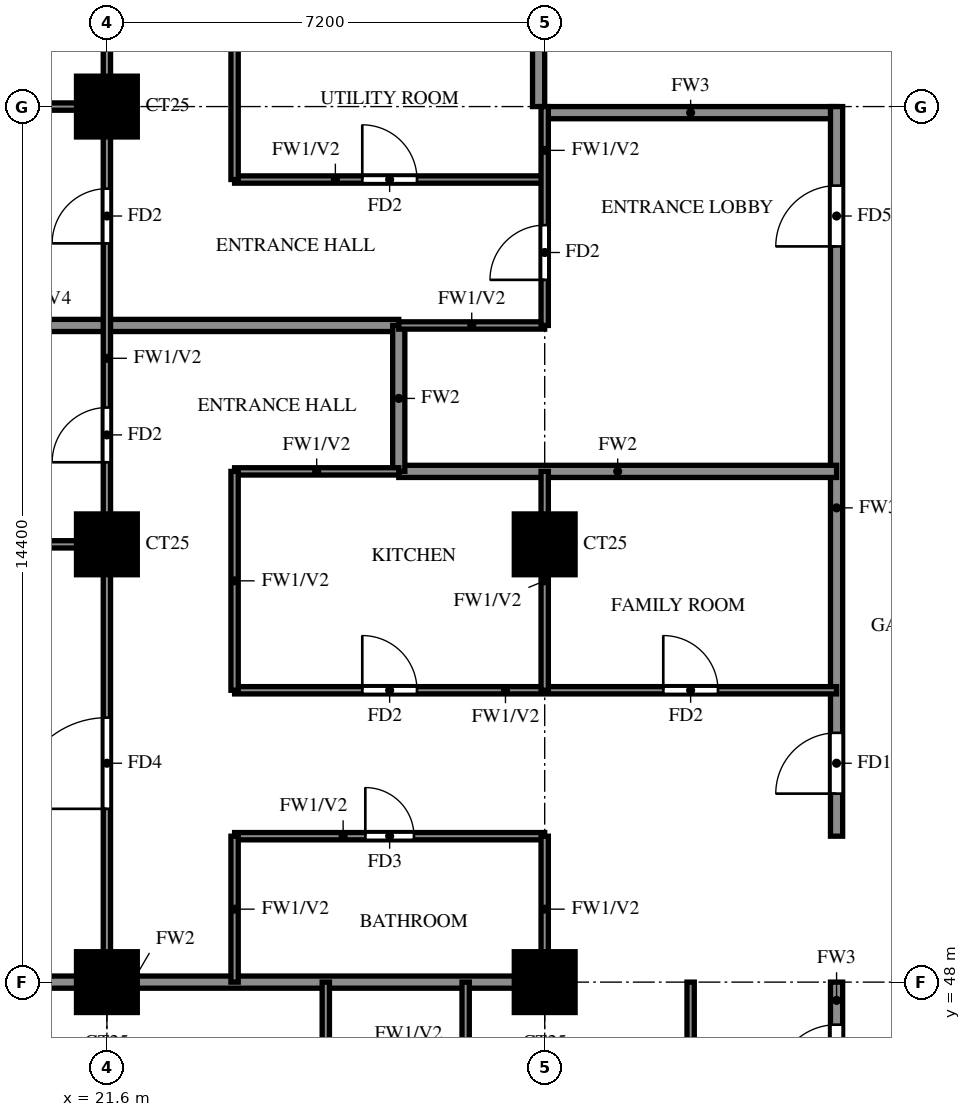
"""IFC4 building model, lengths in metres.
Left out: names, types, materials, properties, quantities, classifications, styles, units other than length and angle.
Written with IfcOpenShell. Run it as: python <this file> out.ifc"""

import sys

from ifc_helpers import new_model, si_unit, direction, frame, frame_2d, origin, origin_2d, place, context, subcontext, project, spatial, rectangle, extrude, source, transform, mapped, element, fill, save


model = new_model("IFC4")
c1 = context("Model", 3, precision=1e-05, world=origin(), true_north=direction((0.0, 1.0)))
c2 = subcontext(c1, "Body", "Model", "MODEL_VIEW")
j1 = project(units=[si_unit("LENGTHUNIT", "METRE"), si_unit("PLANEANGLEUNIT", "RADIAN")], contexts=[c1])
p1 = place(None, origin())
s1 = spatial("IfcSite", under=j1, at=p1, CompositionType="ELEMENT")
p2 = place(p1, origin())
s2 = spatial("IfcBuilding", under=s1, at=p2, CompositionType="ELEMENT")
p3 = place(p2, frame((0.0, 0.0, 153.5)))
s3 = spatial("IfcBuildingStorey", under=s2, at=p3, CompositionType="ELEMENT", Elevation=153.5)
m1 = source(origin(), c2, "Body", "SweptSolid", [
    extrude(rectangle(XDim=1.0, YDim=1.0, at=origin_2d()), origin(), (0.0, 0.0, 1.0), 3.2),
])
for number, where, z_axis, x_axis in (
    (1, (21.6, 48.0, 0.0), (0.0, 0.0, 1.0), (1.0, 0.0, 0.0)),
    (2, (28.8, 48.0, 0.0), (0.0, 0.0, 1.0), (1.0, 0.0, 0.0)),
    (3, (21.6, 55.2, 0.0), (0.0, 0.0, 1.0), (1.0, 0.0, 0.0)),
    (4, (28.8, 55.2, 0.0), (0.0, 0.0, 1.0), (1.0, 0.0, 0.0)),
    (5, (21.6, 62.4, 0.0), (0.0, 0.0, 1.0), (1.0, 0.0, 0.0)),
):
    element("IfcColumn", number, at=place(p3, frame(where, z_axis=z_axis, x_axis=x_axis)), inside=s3, PredefinedType="COLUMN", context=c2, shape_type="MappedRepresentation", body=[
        mapped(m1, transform((0.0, 0.0, 0.0))),
    ])
p4 = place(p3, frame((28.8, 62.3, 0.0), z_axis=(0.0, 0.0, 1.0), x_axis=(1.0, 0.0, 0.0)))
e6 = element("IfcWall", 6, at=p4, inside=s3, PredefinedType="SOLIDWALL", context=c2, shape_type="SweptSolid", body=[
    extrude(rectangle(XDim=4.8, YDim=0.2, at=frame_2d((2.4, 0.0))), origin(), (0.0, 0.0, 1.0), 3.2),
])
p5 = place(p3, frame((28.7, 62.4, 0.0), z_axis=(0.0, 0.0, 1.0), x_axis=(0.0, 1.0, 0.0)))
e7 = element("IfcWall", 7, at=p5, inside=s3, PredefinedType="SOLIDWALL", context=c2, shape_type="SweptSolid", body=[
    extrude(rectangle(XDim=15.6, YDim=0.2, at=frame_2d((7.8, 0.0))), origin(), (0.0, 0.0, 1.0), 3.2),
])
p6 = place(p3, frame((33.6, 45.6, 0.0), z_axis=(0.0, 0.0, 1.0), x_axis=(0.0, 1.0, 0.0)))
e8 = element("IfcWall", 8, at=p6, inside=s3, PredefinedType="SOLIDWALL", context=c2, shape_type="SweptSolid", body=[
    extrude(rectangle(XDim=2.4, YDim=0.2, at=frame_2d((1.2, 0.0))), origin(), (0.0, 0.0, 1.0), 3.2),
])
p7 = place(p6, frame((0.7, 0.0, 0.0)))
e9 = element("IfcOpeningElement", 9, at=p7, cuts=e8, PredefinedType="OPENING", context=c2, shape_type="SweptSolid", body=[
    extrude(rectangle(XDim=1.0, YDim=2.1, at=frame_2d((0.5, 1.05))), frame((0.0, 0.11, 0.0), z_axis=(0.0, -1.0, 0.0), x_axis=(1.0, 0.0, 0.0)), (0.0, 0.0, 1.0), 0.22),
])
p8 = place(p3, frame((33.6, 50.4, 0.0), z_axis=(0.0, 0.0, 1.0), x_axis=(0.0, 1.0, 0.0)))
e10 = element("IfcWall", 10, at=p8, inside=s3, PredefinedType="SOLIDWALL", context=c2, shape_type="SweptSolid", body=[
    extrude(rectangle(XDim=12.0, YDim=0.2, at=frame_2d((6.0, 0.0))), origin(), (0.0, 0.0, 1.0), 3.2),
])
p9 = place(p8, frame((0.7, 0.0, 0.0)))
e11 = element("IfcOpeningElement", 11, at=p9, cuts=e10, PredefinedType="OPENING", context=c2, shape_type="SweptSolid", body=[
    extrude(rectangle(XDim=1.0, YDim=2.1, at=frame_2d((0.5, 1.05))), frame((0.0, 0.11, 0.0), z_axis=(0.0, -1.0, 0.0), x_axis=(1.0, 0.0, 0.0)), (0.0, 0.0, 1.0), 0.22),
])
p10 = place(p8, frame((9.7, 0.0, 0.0)))
e12 = element("IfcOpeningElement", 12, at=p10, cuts=e10, PredefinedType="OPENING", context=c2, shape_type="SweptSolid", body=[
    extrude(rectangle(XDim=1.0, YDim=2.1, at=frame_2d((0.5, 1.05))), frame((0.0, 0.11, 0.0), z_axis=(0.0, -1.0, 0.0), x_axis=(1.0, 0.0, 0.0)), (0.0, 0.0, 1.0), 0.22),
])
p11 = place(p3, frame((14.525, 48.0, 0.0), z_axis=(0.0, 0.0, 1.0), x_axis=(1.0, 0.0, 0.0)))
e13 = element("IfcWall", 13, at=p11, inside=s3, PredefinedType="SOLIDWALL", context=c2, shape_type="SweptSolid", body=[
    extrude(rectangle(XDim=14.275, YDim=0.2, at=frame_2d((7.138, 0.0))), origin(), (0.0, 0.0, 1.0), 3.2),
])
p12 = place(p3, frame((26.4, 56.4, 0.0), z_axis=(0.0, 0.0, 1.0), x_axis=(1.0, 0.0, 0.0)))
e14 = element("IfcWall", 14, at=p12, inside=s3, PredefinedType="SOLIDWALL", context=c2, shape_type="SweptSolid", body=[
    extrude(rectangle(XDim=7.2, YDim=0.2, at=frame_2d((3.6, 0.0))), origin(), (0.0, 0.0, 1.0), 3.2),
])
p13 = place(p3, frame((14.525, 58.8, 0.0), z_axis=(0.0, 0.0, 1.0), x_axis=(1.0, 0.0, 0.0)))
e15 = element("IfcWall", 15, at=p13, inside=s3, PredefinedType="SOLIDWALL", context=c2, shape_type="SweptSolid", body=[
    extrude(rectangle(XDim=11.875, YDim=0.2, at=frame_2d((5.938, 0.0))), origin(), (0.0, 0.0, 1.0), 2.3),
])
p14 = place(p3, frame((26.4, 56.4, 0.0), z_axis=(0.0, 0.0, 1.0), x_axis=(0.0, 1.0, 0.0)))
e16 = element("IfcWall", 16, at=p14, inside=s3, PredefinedType="SOLIDWALL", context=c2, shape_type="SweptSolid", body=[
    extrude(rectangle(XDim=2.4, YDim=0.2, at=frame_2d((1.2, 0.0))), origin(), (0.0, 0.0, 1.0), 3.2),
])
p15 = place(p3, frame((23.7, 50.4, 0.0), z_axis=(0.0, 0.0, 1.0), x_axis=(1.0, 0.0, 0.0)))
e17 = element("IfcWall", 17, at=p15, inside=s3, PredefinedType="PARTITIONING", context=c2, shape_type="SweptSolid", body=[
    extrude(rectangle(XDim=5.1, YDim=0.12, at=frame_2d((2.55, 0.0))), origin(), (0.0, 0.0, 1.0), 3.2),
])
p16 = place(p15, frame((2.15, 0.0, 0.0)))
e18 = element("IfcOpeningElement", 18, at=p16, cuts=e17, PredefinedType="OPENING", context=c2, shape_type="SweptSolid", body=[
    extrude(rectangle(XDim=0.8, YDim=2.1, at=frame_2d((0.4, 1.05))), frame((0.0, 0.07, 0.0), z_axis=(0.0, -1.0, 0.0), x_axis=(1.0, 0.0, 0.0)), (0.0, 0.0, 1.0), 0.14),
])
p17 = place(p3, frame((23.7, 52.8, 0.0), z_axis=(0.0, 0.0, 1.0), x_axis=(1.0, 0.0, 0.0)))
e19 = element("IfcWall", 19, at=p17, inside=s3, PredefinedType="PARTITIONING", context=c2, shape_type="SweptSolid", body=[
    extrude(rectangle(XDim=9.9, YDim=0.12, at=frame_2d((4.95, 0.0))), origin(), (0.0, 0.0, 1.0), 3.2),
])
p18 = place(p17, frame((2.1, 0.0, 0.0)))
e20 = element("IfcOpeningElement", 20, at=p18, cuts=e19, PredefinedType="OPENING", context=c2, shape_type="SweptSolid", body=[
    extrude(rectangle(XDim=0.9, YDim=2.1, at=frame_2d((0.45, 1.05))), frame((0.0, 0.07, 0.0), z_axis=(0.0, -1.0, 0.0), x_axis=(1.0, 0.0, 0.0)), (0.0, 0.0, 1.0), 0.14),
])
p19 = place(p17, frame((7.05, 0.0, 0.0)))
e21 = element("IfcOpeningElement", 21, at=p19, cuts=e19, PredefinedType="OPENING", context=c2, shape_type="SweptSolid", body=[
    extrude(rectangle(XDim=0.9, YDim=2.1, at=frame_2d((0.45, 1.05))), frame((0.0, 0.07, 0.0), z_axis=(0.0, -1.0, 0.0), x_axis=(1.0, 0.0, 0.0)), (0.0, 0.0, 1.0), 0.14),
])
p20 = place(p3, frame((14.525, 55.2, 0.0), z_axis=(0.0, 0.0, 1.0), x_axis=(1.0, 0.0, 0.0)))
e22 = element("IfcWall", 22, at=p20, inside=s3, PredefinedType="PARTITIONING", context=c2, shape_type="SweptSolid", body=[
    extrude(rectangle(XDim=7.075, YDim=0.12, at=frame_2d((3.538, 0.0))), origin(), (0.0, 0.0, 1.0), 3.2),
])
p21 = place(p3, frame((23.7, 56.4, 0.0), z_axis=(0.0, 0.0, 1.0), x_axis=(1.0, 0.0, 0.0)))
e23 = element("IfcWall", 23, at=p21, inside=s3, PredefinedType="PARTITIONING", context=c2, shape_type="SweptSolid", body=[
    extrude(rectangle(XDim=2.7, YDim=0.12, at=frame_2d((1.35, 0.0))), origin(), (0.0, 0.0, 1.0), 3.2),
])
p22 = place(p3, frame((26.4, 58.8, 0.0), z_axis=(0.0, 0.0, 1.0), x_axis=(1.0, 0.0, 0.0)))
e24 = element("IfcWall", 24, at=p22, inside=s3, PredefinedType="PARTITIONING", context=c2, shape_type="SweptSolid", body=[
    extrude(rectangle(XDim=2.4, YDim=0.12, at=frame_2d((1.2, 0.0))), origin(), (0.0, 0.0, 1.0), 3.2),
])
p23 = place(p3, frame((23.7, 61.2, 0.0), z_axis=(0.0, 0.0, 1.0), x_axis=(1.0, 0.0, 0.0)))
e25 = element("IfcWall", 25, at=p23, inside=s3, PredefinedType="PARTITIONING", context=c2, shape_type="SweptSolid", body=[
    extrude(rectangle(XDim=5.1, YDim=0.12, at=frame_2d((2.55, 0.0))), origin(), (0.0, 0.0, 1.0), 3.2),
])
p24 = place(p23, frame((2.1, 0.0, 0.0)))
e26 = element("IfcOpeningElement", 26, at=p24, cuts=e25, PredefinedType="OPENING", context=c2, shape_type="SweptSolid", body=[
    extrude(rectangle(XDim=0.9, YDim=2.1, at=frame_2d((0.45, 1.05))), frame((0.0, 0.07, 0.0), z_axis=(0.0, -1.0, 0.0), x_axis=(1.0, 0.0, 0.0)), (0.0, 0.0, 1.0), 0.14),
])
p25 = place(p3, frame((14.525, 62.4, 0.0), z_axis=(0.0, 0.0, 1.0), x_axis=(1.0, 0.0, 0.0)))
e27 = element("IfcWall", 27, at=p25, inside=s3, PredefinedType="PARTITIONING", context=c2, shape_type="SweptSolid", body=[
    extrude(rectangle(XDim=7.075, YDim=0.12, at=frame_2d((3.538, 0.0))), origin(), (0.0, 0.0, 1.0), 3.2),
])
p26 = place(p3, frame((21.6, 48.0, 0.0), z_axis=(0.0, 0.0, 1.0), x_axis=(0.0, 1.0, 0.0)))
e28 = element("IfcWall", 28, at=p26, inside=s3, PredefinedType="PARTITIONING", context=c2, shape_type="SweptSolid", body=[
    extrude(rectangle(XDim=21.6, YDim=0.12, at=frame_2d((10.8, 0.0))), origin(), (0.0, 0.0, 1.0), 3.2),
])
p27 = place(p26, frame((2.85, 0.0, 0.0)))
e29 = element("IfcOpeningElement", 29, at=p27, cuts=e28, PredefinedType="OPENING", context=c2, shape_type="SweptSolid", body=[
    extrude(rectangle(XDim=1.5, YDim=2.1, at=frame_2d((0.75, 1.05))), frame((0.0, 0.07, 0.0), z_axis=(0.0, -1.0, 0.0), x_axis=(1.0, 0.0, 0.0)), (0.0, 0.0, 1.0), 0.14),
])
p28 = place(p26, frame((8.55, 0.0, 0.0)))
e30 = element("IfcOpeningElement", 30, at=p28, cuts=e28, PredefinedType="OPENING", context=c2, shape_type="SweptSolid", body=[
    extrude(rectangle(XDim=0.9, YDim=2.1, at=frame_2d((0.45, 1.05))), frame((0.0, 0.07, 0.0), z_axis=(0.0, -1.0, 0.0), x_axis=(1.0, 0.0, 0.0)), (0.0, 0.0, 1.0), 0.14),
])
p29 = place(p26, frame((12.15, 0.0, 0.0)))
e31 = element("IfcOpeningElement", 31, at=p29, cuts=e28, PredefinedType="OPENING", context=c2, shape_type="SweptSolid", body=[
    extrude(rectangle(XDim=0.9, YDim=2.1, at=frame_2d((0.45, 1.05))), frame((0.0, 0.07, 0.0), z_axis=(0.0, -1.0, 0.0), x_axis=(1.0, 0.0, 0.0)), (0.0, 0.0, 1.0), 0.14),
])
p30 = place(p26, frame((17.55, 0.0, 0.0)))
e32 = element("IfcOpeningElement", 32, at=p30, cuts=e28, PredefinedType="OPENING", context=c2, shape_type="SweptSolid", body=[
    extrude(rectangle(XDim=0.9, YDim=2.1, at=frame_2d((0.45, 1.05))), frame((0.0, 0.07, 0.0), z_axis=(0.0, -1.0, 0.0), x_axis=(1.0, 0.0, 0.0)), (0.0, 0.0, 1.0), 0.14),
])
p31 = place(p3, frame((23.7, 48.0, 0.0), z_axis=(0.0, 0.0, 1.0), x_axis=(0.0, 1.0, 0.0)))
e33 = element("IfcWall", 33, at=p31, inside=s3, PredefinedType="PARTITIONING", context=c2, shape_type="SweptSolid", body=[
    extrude(rectangle(XDim=2.4, YDim=0.12, at=frame_2d((1.2, 0.0))), origin(), (0.0, 0.0, 1.0), 3.2),
])
p32 = place(p3, frame((23.7, 52.8, 0.0), z_axis=(0.0, 0.0, 1.0), x_axis=(0.0, 1.0, 0.0)))
e34 = element("IfcWall", 34, at=p32, inside=s3, PredefinedType="PARTITIONING", context=c2, shape_type="SweptSolid", body=[
    extrude(rectangle(XDim=3.6, YDim=0.12, at=frame_2d((1.8, 0.0))), origin(), (0.0, 0.0, 1.0), 3.2),
])
p33 = place(p3, frame((23.7, 61.2, 0.0), z_axis=(0.0, 0.0, 1.0), x_axis=(0.0, 1.0, 0.0)))
e35 = element("IfcWall", 35, at=p33, inside=s3, PredefinedType="PARTITIONING", context=c2, shape_type="SweptSolid", body=[
    extrude(rectangle(XDim=12.0, YDim=0.12, at=frame_2d((6.0, 0.0))), origin(), (0.0, 0.0, 1.0), 3.2),
])
p34 = place(p33, frame((4.2, 0.0, 0.0)))
e36 = element("IfcOpeningElement", 36, at=p34, cuts=e35, PredefinedType="OPENING", context=c2, shape_type="SweptSolid", body=[
    extrude(rectangle(XDim=0.9, YDim=2.1, at=frame_2d((0.45, 1.05))), frame((0.0, 0.07, 0.0), z_axis=(0.0, -1.0, 0.0), x_axis=(1.0, 0.0, 0.0)), (0.0, 0.0, 1.0), 0.14),
])
p35 = place(p33, frame((7.975, 0.0, 0.0)))
e37 = element("IfcOpeningElement", 37, at=p35, cuts=e35, PredefinedType="OPENING", context=c2, shape_type="SweptSolid", body=[
    extrude(rectangle(XDim=0.8, YDim=2.1, at=frame_2d((0.4, 1.05))), frame((0.0, 0.07, 0.0), z_axis=(0.0, -1.0, 0.0), x_axis=(1.0, 0.0, 0.0)), (0.0, 0.0, 1.0), 0.14),
])
p36 = place(p33, frame((10.45, 0.0, 0.0)))
e38 = element("IfcOpeningElement", 38, at=p36, cuts=e35, PredefinedType="OPENING", context=c2, shape_type="SweptSolid", body=[
    extrude(rectangle(XDim=0.8, YDim=2.1, at=frame_2d((0.4, 1.05))), frame((0.0, 0.07, 0.0), z_axis=(0.0, -1.0, 0.0), x_axis=(1.0, 0.0, 0.0)), (0.0, 0.0, 1.0), 0.14),
])
p37 = place(p3, frame((25.2, 39.725, 0.0), z_axis=(0.0, 0.0, 1.0), x_axis=(0.0, 1.0, 0.0)))
e39 = element("IfcWall", 39, at=p37, inside=s3, PredefinedType="PARTITIONING", context=c2, shape_type="SweptSolid", body=[
    extrude(rectangle(XDim=8.275, YDim=0.12, at=frame_2d((4.137, 0.0))), origin(), (0.0, 0.0, 1.0), 3.2),
])
p38 = place(p37, frame((4.525, 0.0, 0.0)))
e40 = element("IfcOpeningElement", 40, at=p38, cuts=e39, PredefinedType="OPENING", context=c2, shape_type="SweptSolid", body=[
    extrude(rectangle(XDim=0.9, YDim=2.1, at=frame_2d((0.45, 1.05))), frame((0.0, 0.07, 0.0), z_axis=(0.0, -1.0, 0.0), x_axis=(1.0, 0.0, 0.0)), (0.0, 0.0, 1.0), 0.14),
])
for number, where, z_axis, x_axis in (
    (41, (27.5, 45.6, 0.0), (0.0, 0.0, 1.0), (0.0, 1.0, 0.0)),
    (42, (28.8, 48.0, 0.0), (0.0, 0.0, 1.0), (0.0, 1.0, 0.0)),
):
    element("IfcWall", number, at=place(p3, frame(where, z_axis=z_axis, x_axis=x_axis)), inside=s3, PredefinedType="PARTITIONING", context=c2, shape_type="SweptSolid", body=[
        extrude(rectangle(XDim=2.4, YDim=0.12, at=frame_2d((1.2, 0.0))), origin(), (0.0, 0.0, 1.0), 3.2),
    ])
p39 = place(p3, frame((28.8, 52.8, 0.0), z_axis=(0.0, 0.0, 1.0), x_axis=(0.0, 1.0, 0.0)))
e43 = element("IfcWall", 43, at=p39, inside=s3, PredefinedType="PARTITIONING", context=c2, shape_type="SweptSolid", body=[
    extrude(rectangle(XDim=3.6, YDim=0.12, at=frame_2d((1.8, 0.0))), origin(), (0.0, 0.0, 1.0), 3.2),
])
p40 = place(p3, frame((28.8, 58.8, 0.0), z_axis=(0.0, 0.0, 1.0), x_axis=(0.0, 1.0, 0.0)))
e44 = element("IfcWall", 44, at=p40, inside=s3, PredefinedType="PARTITIONING", context=c2, shape_type="SweptSolid", body=[
    extrude(rectangle(XDim=3.6, YDim=0.12, at=frame_2d((1.8, 0.0))), origin(), (0.0, 0.0, 1.0), 3.2),
])
p41 = place(p40, frame((0.75, 0.0, 0.0)))
e45 = element("IfcOpeningElement", 45, at=p41, cuts=e44, PredefinedType="OPENING", context=c2, shape_type="SweptSolid", body=[
    extrude(rectangle(XDim=0.9, YDim=2.1, at=frame_2d((0.45, 1.05))), frame((0.0, 0.07, 0.0), z_axis=(0.0, -1.0, 0.0), x_axis=(1.0, 0.0, 0.0)), (0.0, 0.0, 1.0), 0.14),
])
p42 = place(p3, frame((31.2, 45.6, 0.0), z_axis=(0.0, 0.0, 1.0), x_axis=(0.0, 1.0, 0.0)))
e46 = element("IfcWall", 46, at=p42, inside=s3, PredefinedType="PARTITIONING", context=c2, shape_type="SweptSolid", body=[
    extrude(rectangle(XDim=2.4, YDim=0.12, at=frame_2d((1.2, 0.0))), origin(), (0.0, 0.0, 1.0), 3.2),
])
p43 = place(p7, origin())
e47 = element("IfcDoor", 47, at=p43, inside=s3, OperationType="SINGLE_SWING_LEFT", PredefinedType="DOOR", context=c2, shape_type="SweptSolid", body=[
    extrude(rectangle(XDim=1.0, YDim=2.1, at=frame_2d((0.5, 1.05))), frame((0.0, 0.025, 0.0), z_axis=(0.0, -1.0, 0.0), x_axis=(1.0, 0.0, 0.0)), (0.0, 0.0, 1.0), 0.05),
])
fill(e9, e47)
p44 = place(p9, origin())
e48 = element("IfcDoor", 48, at=p44, inside=s3, OperationType="SINGLE_SWING_LEFT", PredefinedType="DOOR", context=c2, shape_type="SweptSolid", body=[
    extrude(rectangle(XDim=1.0, YDim=2.1, at=frame_2d((0.5, 1.05))), frame((0.0, 0.025, 0.0), z_axis=(0.0, -1.0, 0.0), x_axis=(1.0, 0.0, 0.0)), (0.0, 0.0, 1.0), 0.05),
])
fill(e11, e48)
p45 = place(p27, origin())
e49 = element("IfcDoor", 49, at=p45, inside=s3, OperationType="SINGLE_SWING_RIGHT", PredefinedType="DOOR", context=c2, shape_type="SweptSolid", body=[
    extrude(rectangle(XDim=1.5, YDim=2.1, at=frame_2d((0.75, 1.05))), frame((0.0, 0.025, 0.0), z_axis=(0.0, -1.0, 0.0), x_axis=(1.0, 0.0, 0.0)), (0.0, 0.0, 1.0), 0.05),
])
fill(e29, e49)
p46 = place(p28, origin())
e50 = element("IfcDoor", 50, at=p46, inside=s3, OperationType="SINGLE_SWING_LEFT", PredefinedType="DOOR", context=c2, shape_type="SweptSolid", body=[
    extrude(rectangle(XDim=0.9, YDim=2.1, at=frame_2d((0.45, 1.05))), frame((0.0, 0.025, 0.0), z_axis=(0.0, -1.0, 0.0), x_axis=(1.0, 0.0, 0.0)), (0.0, 0.0, 1.0), 0.05),
])
fill(e30, e50)
p47 = place(p16, origin())
e51 = element("IfcDoor", 51, at=p47, inside=s3, OperationType="SINGLE_SWING_LEFT", PredefinedType="DOOR", context=c2, shape_type="SweptSolid", body=[
    extrude(rectangle(XDim=0.8, YDim=2.1, at=frame_2d((0.4, 1.05))), frame((0.0, 0.025, 0.0), z_axis=(0.0, -1.0, 0.0), x_axis=(1.0, 0.0, 0.0)), (0.0, 0.0, 1.0), 0.05),
])
fill(e18, e51)
p48 = place(p18, origin())
e52 = element("IfcDoor", 52, at=p48, inside=s3, OperationType="SINGLE_SWING_RIGHT", PredefinedType="DOOR", context=c2, shape_type="SweptSolid", body=[
    extrude(rectangle(XDim=0.9, YDim=2.1, at=frame_2d((0.45, 1.05))), frame((0.0, 0.025, 0.0), z_axis=(0.0, -1.0, 0.0), x_axis=(1.0, 0.0, 0.0)), (0.0, 0.0, 1.0), 0.05),
])
fill(e20, e52)
p49 = place(p19, origin())
e53 = element("IfcDoor", 53, at=p49, inside=s3, OperationType="SINGLE_SWING_LEFT", PredefinedType="DOOR", context=c2, shape_type="SweptSolid", body=[
    extrude(rectangle(XDim=0.9, YDim=2.1, at=frame_2d((0.45, 1.05))), frame((0.0, 0.025, 0.0), z_axis=(0.0, -1.0, 0.0), x_axis=(1.0, 0.0, 0.0)), (0.0, 0.0, 1.0), 0.05),
])
fill(e21, e53)
p50 = place(p41, origin())
e54 = element("IfcDoor", 54, at=p50, inside=s3, OperationType="SINGLE_SWING_RIGHT", PredefinedType="DOOR", context=c2, shape_type="SweptSolid", body=[
    extrude(rectangle(XDim=0.9, YDim=2.1, at=frame_2d((0.45, 1.05))), frame((0.0, 0.025, 0.0), z_axis=(0.0, -1.0, 0.0), x_axis=(1.0, 0.0, 0.0)), (0.0, 0.0, 1.0), 0.05),
])
fill(e45, e54)
p51 = place(p10, origin())
e55 = element("IfcDoor", 55, at=p51, inside=s3, OperationType="SINGLE_SWING_LEFT", PredefinedType="DOOR", context=c2, shape_type="SweptSolid", body=[
    extrude(rectangle(XDim=1.0, YDim=2.1, at=frame_2d((0.5, 1.05))), frame((0.0, 0.025, 0.0), z_axis=(0.0, -1.0, 0.0), x_axis=(1.0, 0.0, 0.0)), (0.0, 0.0, 1.0), 0.05),
])
fill(e12, e55)
p52 = place(p29, origin())
e56 = element("IfcDoor", 56, at=p52, inside=s3, OperationType="SINGLE_SWING_LEFT", PredefinedType="DOOR", context=c2, shape_type="SweptSolid", body=[
    extrude(rectangle(XDim=0.9, YDim=2.1, at=frame_2d((0.45, 1.05))), frame((0.0, 0.025, 0.0), z_axis=(0.0, -1.0, 0.0), x_axis=(1.0, 0.0, 0.0)), (0.0, 0.0, 1.0), 0.05),
])
fill(e31, e56)
p53 = place(p24, origin())
e57 = element("IfcDoor", 57, at=p53, inside=s3, OperationType="SINGLE_SWING_RIGHT", PredefinedType="DOOR", context=c2, shape_type="SweptSolid", body=[
    extrude(rectangle(XDim=0.9, YDim=2.1, at=frame_2d((0.45, 1.05))), frame((0.0, 0.025, 0.0), z_axis=(0.0, -1.0, 0.0), x_axis=(1.0, 0.0, 0.0)), (0.0, 0.0, 1.0), 0.05),
])
fill(e26, e57)
save(model, sys.argv[1])
